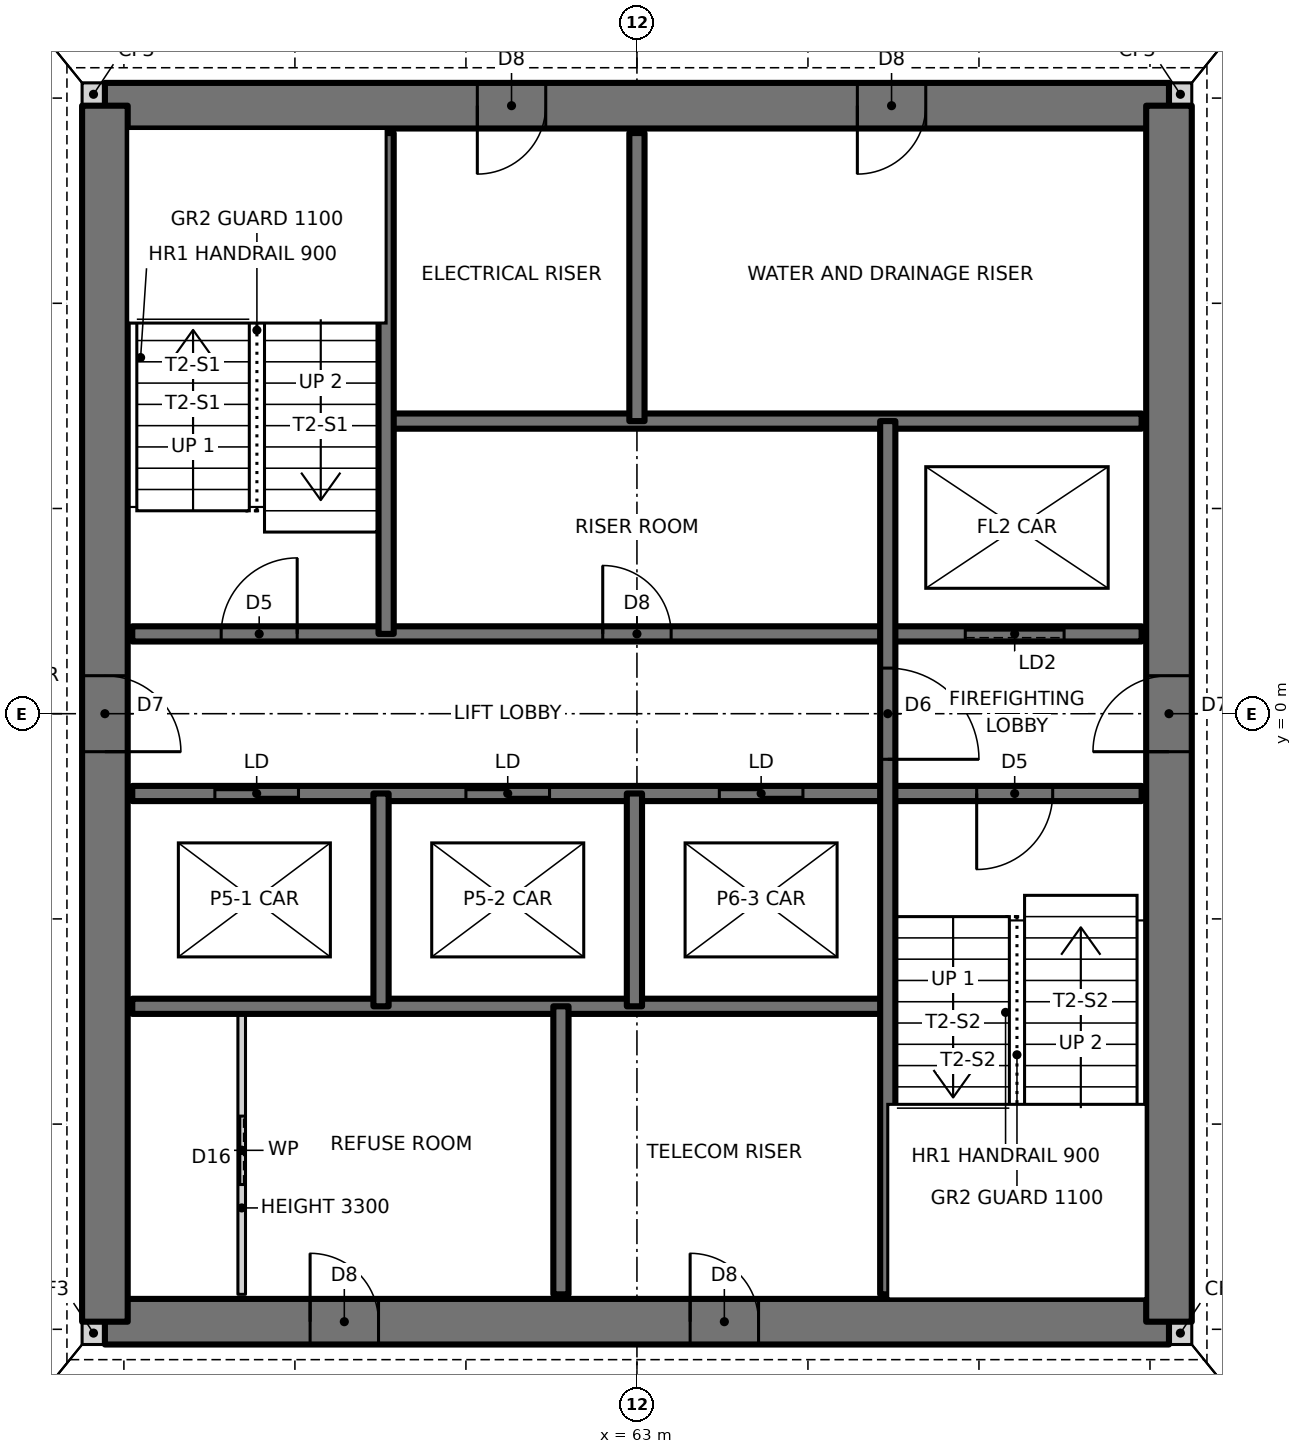
"""IFC4 building model, lengths in metres.
Left out: names, types, materials, properties, quantities, classifications, styles, units other than length and angle.
Written with IfcOpenShell. Run it as: python <this file> out.ifc"""

import sys

from ifc_helpers import new_model, si_unit, direction, frame, frame_2d, origin, place, context, subcontext, project, spatial, rectangle, extrude, element, fill, save


model = new_model("IFC4")
c1 = context("Model", 3, precision=1e-05, world=origin(), true_north=direction((0.0, 1.0)))
c2 = subcontext(c1, "Body", "Model", "MODEL_VIEW")
j1 = project(units=[si_unit("LENGTHUNIT", "METRE"), si_unit("PLANEANGLEUNIT", "RADIAN")], contexts=[c1])
p1 = place(None, origin())
s1 = spatial("IfcSite", under=j1, at=p1, CompositionType="ELEMENT")
p2 = place(p1, origin())
s2 = spatial("IfcBuilding", under=s1, at=p2, CompositionType="ELEMENT")
p3 = place(p2, frame((0.0, 0.0, 115.5)))
s3 = spatial("IfcBuildingStorey", under=s2, at=p3, CompositionType="ELEMENT", Elevation=115.5)
for number, where, z_axis, x_axis in (
    (1, (55.7, -8.15, 0.0), (0.0, 0.0, 1.0), (1.0, 0.0, 0.0)),
    (2, (70.0, -8.15, 0.0), (0.0, 0.0, 1.0), (1.0, 0.0, 0.0)),
    (3, (70.0, 8.15, 0.0), (0.0, 0.0, 1.0), (1.0, 0.0, 0.0)),
    (4, (55.7, 8.15, 0.0), (0.0, 0.0, 1.0), (1.0, 0.0, 0.0)),
):
    element("IfcWall", number, at=place(p3, frame(where, z_axis=z_axis, x_axis=x_axis)), inside=s3, PredefinedType="SOLIDWALL", context=c2, shape_type="SweptSolid", body=[
        extrude(rectangle(XDim=0.3, YDim=0.3, at=frame_2d((0.15, 0.0))), origin(), (0.0, 0.0, 1.0), 3.5),
    ])
p4 = place(p3, frame((56.0, -8.0, 0.0), z_axis=(0.0, 0.0, 1.0), x_axis=(1.0, 0.0, 0.0)))
e5 = element("IfcWall", 5, at=p4, inside=s3, PredefinedType="SHEAR", context=c2, shape_type="SweptSolid", body=[
    extrude(rectangle(XDim=14.0, YDim=0.6, at=frame_2d((7.0, 0.0))), origin(), (0.0, 0.0, 1.0), 3.5),
])
p5 = place(p4, frame((2.7, 0.0, 0.0)))
e6 = element("IfcOpeningElement", 6, at=p5, cuts=e5, PredefinedType="OPENING", context=c2, shape_type="SweptSolid", body=[
    extrude(rectangle(XDim=0.9, YDim=2.1, at=frame_2d((0.45, 1.05))), frame((0.0, 0.31, 0.0), z_axis=(0.0, -1.0, 0.0), x_axis=(1.0, 0.0, 0.0)), (0.0, 0.0, 1.0), 0.62),
])
p6 = place(p4, frame((7.7, 0.0, 0.0)))
e7 = element("IfcOpeningElement", 7, at=p6, cuts=e5, PredefinedType="OPENING", context=c2, shape_type="SweptSolid", body=[
    extrude(rectangle(XDim=0.9, YDim=2.1, at=frame_2d((0.45, 1.05))), frame((0.0, 0.31, 0.0), z_axis=(0.0, -1.0, 0.0), x_axis=(1.0, 0.0, 0.0)), (0.0, 0.0, 1.0), 0.62),
])
p7 = place(p3, frame((70.0, 8.0, 0.0), z_axis=(0.0, 0.0, 1.0), x_axis=(-1.0, 0.0, 0.0)))
e8 = element("IfcWall", 8, at=p7, inside=s3, PredefinedType="SHEAR", context=c2, shape_type="SweptSolid", body=[
    extrude(rectangle(XDim=14.0, YDim=0.6, at=frame_2d((7.0, 0.0))), origin(), (0.0, 0.0, 1.0), 3.5),
])
p8 = place(p7, frame((8.2, 0.0, 0.0)))
e9 = element("IfcOpeningElement", 9, at=p8, cuts=e8, PredefinedType="OPENING", context=c2, shape_type="SweptSolid", body=[
    extrude(rectangle(XDim=0.9, YDim=2.1, at=frame_2d((0.45, 1.05))), frame((0.0, 0.31, 0.0), z_axis=(0.0, -1.0, 0.0), x_axis=(1.0, 0.0, 0.0)), (0.0, 0.0, 1.0), 0.62),
])
p9 = place(p7, frame((3.2, 0.0, 0.0)))
e10 = element("IfcOpeningElement", 10, at=p9, cuts=e8, PredefinedType="OPENING", context=c2, shape_type="SweptSolid", body=[
    extrude(rectangle(XDim=0.9, YDim=2.1, at=frame_2d((0.45, 1.05))), frame((0.0, 0.31, 0.0), z_axis=(0.0, -1.0, 0.0), x_axis=(1.0, 0.0, 0.0)), (0.0, 0.0, 1.0), 0.62),
])
p10 = place(p3, frame((70.0, -8.0, 0.0), z_axis=(0.0, 0.0, 1.0), x_axis=(0.0, 1.0, 0.0)))
e11 = element("IfcWall", 11, at=p10, inside=s3, PredefinedType="SHEAR", context=c2, shape_type="SweptSolid", body=[
    extrude(rectangle(XDim=16.0, YDim=0.6, at=frame_2d((8.0, 0.0))), origin(), (0.0, 0.0, 1.0), 3.5),
])
p11 = place(p10, frame((7.5, 0.0, 0.0)))
e12 = element("IfcOpeningElement", 12, at=p11, cuts=e11, PredefinedType="OPENING", context=c2, shape_type="SweptSolid", body=[
    extrude(rectangle(XDim=1.0, YDim=2.1, at=frame_2d((0.5, 1.05))), frame((0.0, 0.31, 0.0), z_axis=(0.0, -1.0, 0.0), x_axis=(1.0, 0.0, 0.0)), (0.0, 0.0, 1.0), 0.62),
])
p12 = place(p3, frame((56.0, 8.0, 0.0), z_axis=(0.0, 0.0, 1.0), x_axis=(0.0, -1.0, 0.0)))
e13 = element("IfcWall", 13, at=p12, inside=s3, PredefinedType="SHEAR", context=c2, shape_type="SweptSolid", body=[
    extrude(rectangle(XDim=16.0, YDim=0.6, at=frame_2d((8.0, 0.0))), origin(), (0.0, 0.0, 1.0), 3.5),
])
p13 = place(p12, frame((7.5, 0.0, 0.0)))
e14 = element("IfcOpeningElement", 14, at=p13, cuts=e13, PredefinedType="OPENING", context=c2, shape_type="SweptSolid", body=[
    extrude(rectangle(XDim=1.0, YDim=2.1, at=frame_2d((0.5, 1.05))), frame((0.0, 0.31, 0.0), z_axis=(0.0, -1.0, 0.0), x_axis=(1.0, 0.0, 0.0)), (0.0, 0.0, 1.0), 0.62),
])
p14 = place(p3, frame((56.36, -3.85, 0.0), z_axis=(0.0, 0.0, 1.0), x_axis=(1.0, 0.0, 0.0)))
e15 = element("IfcWall", 15, at=p14, inside=s3, PredefinedType="SOLIDWALL", context=c2, shape_type="SweptSolid", body=[
    extrude(rectangle(XDim=9.94, YDim=0.2, at=frame_2d((4.97, 0.0))), origin(), (0.0, 0.0, 1.0), 3.5),
])
p15 = place(p3, frame((56.36, -1.05, 0.0), z_axis=(0.0, 0.0, 1.0), x_axis=(1.0, 0.0, 0.0)))
e16 = element("IfcWall", 16, at=p15, inside=s3, PredefinedType="SOLIDWALL", context=c2, shape_type="SweptSolid", body=[
    extrude(rectangle(XDim=13.28, YDim=0.2, at=frame_2d((6.64, 0.0))), origin(), (0.0, 0.0, 1.0), 3.5),
])
p16 = place(p15, frame((11.11, 0.0, 0.0)))
e17 = element("IfcOpeningElement", 17, at=p16, cuts=e16, PredefinedType="OPENING", context=c2, shape_type="SweptSolid", body=[
    extrude(rectangle(XDim=1.0, YDim=2.1, at=frame_2d((0.5, 1.05))), frame((0.0, 0.11, 0.0), z_axis=(0.0, -1.0, 0.0), x_axis=(1.0, 0.0, 0.0)), (0.0, 0.0, 1.0), 0.22),
])
p17 = place(p15, frame((1.087, 0.0, 0.0)))
e18 = element("IfcOpeningElement", 18, at=p17, cuts=e16, PredefinedType="OPENING", context=c2, shape_type="SweptSolid", body=[
    extrude(rectangle(XDim=1.1, YDim=2.1, at=frame_2d((0.55, 1.05))), frame((0.0, 0.11, 0.0), z_axis=(0.0, -1.0, 0.0), x_axis=(1.0, 0.0, 0.0)), (0.0, 0.0, 1.0), 0.22),
])
p18 = place(p15, frame((4.39, 0.0, 0.0)))
e19 = element("IfcOpeningElement", 19, at=p18, cuts=e16, PredefinedType="OPENING", context=c2, shape_type="SweptSolid", body=[
    extrude(rectangle(XDim=1.1, YDim=2.1, at=frame_2d((0.55, 1.05))), frame((0.0, 0.11, 0.0), z_axis=(0.0, -1.0, 0.0), x_axis=(1.0, 0.0, 0.0)), (0.0, 0.0, 1.0), 0.22),
])
p19 = place(p15, frame((7.724, 0.0, 0.0)))
e20 = element("IfcOpeningElement", 20, at=p19, cuts=e16, PredefinedType="OPENING", context=c2, shape_type="SweptSolid", body=[
    extrude(rectangle(XDim=1.1, YDim=2.1, at=frame_2d((0.55, 1.05))), frame((0.0, 0.11, 0.0), z_axis=(0.0, -1.0, 0.0), x_axis=(1.0, 0.0, 0.0)), (0.0, 0.0, 1.0), 0.22),
])
p20 = place(p3, frame((56.36, 1.05, 0.0), z_axis=(0.0, 0.0, 1.0), x_axis=(1.0, 0.0, 0.0)))
e21 = element("IfcWall", 21, at=p20, inside=s3, PredefinedType="SOLIDWALL", context=c2, shape_type="SweptSolid", body=[
    extrude(rectangle(XDim=13.28, YDim=0.2, at=frame_2d((6.64, 0.0))), origin(), (0.0, 0.0, 1.0), 3.5),
])
p21 = place(p20, frame((1.17, 0.0, 0.0)))
e22 = element("IfcOpeningElement", 22, at=p21, cuts=e21, PredefinedType="OPENING", context=c2, shape_type="SweptSolid", body=[
    extrude(rectangle(XDim=1.0, YDim=2.1, at=frame_2d((0.5, 1.05))), frame((0.0, 0.11, 0.0), z_axis=(0.0, -1.0, 0.0), x_axis=(1.0, 0.0, 0.0)), (0.0, 0.0, 1.0), 0.22),
])
p22 = place(p20, frame((6.19, 0.0, 0.0)))
e23 = element("IfcOpeningElement", 23, at=p22, cuts=e21, PredefinedType="OPENING", context=c2, shape_type="SweptSolid", body=[
    extrude(rectangle(XDim=0.9, YDim=2.1, at=frame_2d((0.45, 1.05))), frame((0.0, 0.11, 0.0), z_axis=(0.0, -1.0, 0.0), x_axis=(1.0, 0.0, 0.0)), (0.0, 0.0, 1.0), 0.22),
])
p23 = place(p20, frame((10.96, 0.0, 0.0)))
e24 = element("IfcOpeningElement", 24, at=p23, cuts=e21, PredefinedType="OPENING", context=c2, shape_type="SweptSolid", body=[
    extrude(rectangle(XDim=1.3, YDim=2.1, at=frame_2d((0.65, 1.05))), frame((0.0, 0.11, 0.0), z_axis=(0.0, -1.0, 0.0), x_axis=(1.0, 0.0, 0.0)), (0.0, 0.0, 1.0), 0.22),
])
p24 = place(p3, frame((59.7, 3.85, 0.0), z_axis=(0.0, 0.0, 1.0), x_axis=(1.0, 0.0, 0.0)))
e25 = element("IfcWall", 25, at=p24, inside=s3, PredefinedType="SOLIDWALL", context=c2, shape_type="SweptSolid", body=[
    extrude(rectangle(XDim=9.94, YDim=0.2, at=frame_2d((4.97, 0.0))), origin(), (0.0, 0.0, 1.0), 3.5),
])
p25 = place(p3, frame((66.3, -7.64, 0.0), z_axis=(0.0, 0.0, 1.0), x_axis=(0.0, 1.0, 0.0)))
e26 = element("IfcWall", 26, at=p25, inside=s3, PredefinedType="SOLIDWALL", context=c2, shape_type="SweptSolid", body=[
    extrude(rectangle(XDim=11.49, YDim=0.2, at=frame_2d((5.745, 0.0))), origin(), (0.0, 0.0, 1.0), 3.5),
])
p26 = place(p25, frame((7.04, 0.0, 0.0)))
e27 = element("IfcOpeningElement", 27, at=p26, cuts=e26, PredefinedType="OPENING", context=c2, shape_type="SweptSolid", body=[
    extrude(rectangle(XDim=1.2, YDim=2.1, at=frame_2d((0.6, 1.05))), frame((0.0, 0.11, 0.0), z_axis=(0.0, -1.0, 0.0), x_axis=(1.0, 0.0, 0.0)), (0.0, 0.0, 1.0), 0.22),
])
p27 = place(p3, frame((63.0, 3.85, 0.0), z_axis=(0.0, 0.0, 1.0), x_axis=(0.0, 1.0, 0.0)))
e28 = element("IfcWall", 28, at=p27, inside=s3, PredefinedType="SOLIDWALL", context=c2, shape_type="SweptSolid", body=[
    extrude(rectangle(XDim=3.79, YDim=0.2, at=frame_2d((1.895, 0.0))), origin(), (0.0, 0.0, 1.0), 3.5),
])
p28 = place(p3, frame((62.967, -3.85, 0.0), z_axis=(0.0, 0.0, 1.0), x_axis=(0.0, 1.0, 0.0)))
e29 = element("IfcWall", 29, at=p28, inside=s3, PredefinedType="SOLIDWALL", context=c2, shape_type="SweptSolid", body=[
    extrude(rectangle(XDim=2.8, YDim=0.2, at=frame_2d((1.4, 0.0))), origin(), (0.0, 0.0, 1.0), 3.5),
])
p29 = place(p3, frame((62.0, -7.64, 0.0), z_axis=(0.0, 0.0, 1.0), x_axis=(0.0, 1.0, 0.0)))
e30 = element("IfcWall", 30, at=p29, inside=s3, PredefinedType="SOLIDWALL", context=c2, shape_type="SweptSolid", body=[
    extrude(rectangle(XDim=3.79, YDim=0.2, at=frame_2d((1.895, 0.0))), origin(), (0.0, 0.0, 1.0), 3.5),
])
p30 = place(p3, frame((59.7, 1.05, 0.0), z_axis=(0.0, 0.0, 1.0), x_axis=(0.0, 1.0, 0.0)))
e31 = element("IfcWall", 31, at=p30, inside=s3, PredefinedType="SOLIDWALL", context=c2, shape_type="SweptSolid", body=[
    extrude(rectangle(XDim=6.59, YDim=0.2, at=frame_2d((3.295, 0.0))), origin(), (0.0, 0.0, 1.0), 3.5),
])
p31 = place(p3, frame((59.633, -3.85, 0.0), z_axis=(0.0, 0.0, 1.0), x_axis=(0.0, 1.0, 0.0)))
e32 = element("IfcWall", 32, at=p31, inside=s3, PredefinedType="SOLIDWALL", context=c2, shape_type="SweptSolid", body=[
    extrude(rectangle(XDim=2.8, YDim=0.2, at=frame_2d((1.4, 0.0))), origin(), (0.0, 0.0, 1.0), 3.5),
])
p32 = place(p3, frame((57.8, -7.64, 0.0), z_axis=(0.0, 0.0, 1.0), x_axis=(0.0, 1.0, 0.0)))
e33 = element("IfcWall", 33, at=p32, inside=s3, PredefinedType="PARTITIONING", context=c2, shape_type="SweptSolid", body=[
    extrude(rectangle(XDim=3.79, YDim=0.1, at=frame_2d((1.895, 0.0))), origin(), (0.0, 0.0, 1.0), 3.3),
])
p33 = place(p32, frame((1.445, 0.0, 0.0)))
e34 = element("IfcOpeningElement", 34, at=p33, cuts=e33, PredefinedType="OPENING", context=c2, shape_type="SweptSolid", body=[
    extrude(rectangle(XDim=0.9, YDim=2.1, at=frame_2d((0.45, 1.05))), frame((0.0, 0.06, 0.0), z_axis=(0.0, -1.0, 0.0), x_axis=(1.0, 0.0, 0.0)), (0.0, 0.0, 1.0), 0.12),
])
p34 = place(p21, origin())
e35 = element("IfcDoor", 35, at=p34, inside=s3, OperationType="SINGLE_SWING_RIGHT", PredefinedType="DOOR", context=c2, shape_type="SweptSolid", body=[
    extrude(rectangle(XDim=1.0, YDim=2.1, at=frame_2d((0.5, 1.05))), frame((0.0, 0.025, 0.0), z_axis=(0.0, -1.0, 0.0), x_axis=(1.0, 0.0, 0.0)), (0.0, 0.0, 1.0), 0.05),
])
fill(e22, e35)
p35 = place(p16, frame((1.0, 0.0, 0.0), z_axis=(0.0, 0.0, 1.0), x_axis=(-1.0, 0.0, 0.0)))
e36 = element("IfcDoor", 36, at=p35, inside=s3, OperationType="SINGLE_SWING_RIGHT", PredefinedType="DOOR", context=c2, shape_type="SweptSolid", body=[
    extrude(rectangle(XDim=1.0, YDim=2.1, at=frame_2d((0.5, 1.05))), frame((0.0, 0.025, 0.0), z_axis=(0.0, -1.0, 0.0), x_axis=(1.0, 0.0, 0.0)), (0.0, 0.0, 1.0), 0.05),
])
fill(e17, e36)
p36 = place(p26, frame((1.2, 0.0, 0.0), z_axis=(0.0, 0.0, 1.0), x_axis=(-1.0, 0.0, 0.0)))
e37 = element("IfcDoor", 37, at=p36, inside=s3, OperationType="SINGLE_SWING_RIGHT", PredefinedType="DOOR", context=c2, shape_type="SweptSolid", body=[
    extrude(rectangle(XDim=1.2, YDim=2.1, at=frame_2d((0.6, 1.05))), frame((0.0, 0.025, 0.0), z_axis=(0.0, -1.0, 0.0), x_axis=(1.0, 0.0, 0.0)), (0.0, 0.0, 1.0), 0.05),
])
fill(e27, e37)
p37 = place(p22, origin())
e38 = element("IfcDoor", 38, at=p37, inside=s3, OperationType="SINGLE_SWING_LEFT", PredefinedType="DOOR", context=c2, shape_type="SweptSolid", body=[
    extrude(rectangle(XDim=0.9, YDim=2.1, at=frame_2d((0.45, 1.05))), frame((0.0, 0.025, 0.0), z_axis=(0.0, -1.0, 0.0), x_axis=(1.0, 0.0, 0.0)), (0.0, 0.0, 1.0), 0.05),
])
fill(e23, e38)
p38 = place(p33, origin())
e39 = element("IfcDoor", 39, at=p38, inside=s3, OperationType="SLIDING_TO_LEFT", PredefinedType="DOOR", context=c2, shape_type="SweptSolid", body=[
    extrude(rectangle(XDim=0.9, YDim=2.1, at=frame_2d((0.45, 1.05))), frame((0.0, 0.025, 0.0), z_axis=(0.0, -1.0, 0.0), x_axis=(1.0, 0.0, 0.0)), (0.0, 0.0, 1.0), 0.05),
])
fill(e34, e39)
p39 = place(p13, origin())
e40 = element("IfcDoor", 40, at=p39, inside=s3, OperationType="SINGLE_SWING_RIGHT", PredefinedType="DOOR", context=c2, shape_type="SweptSolid", body=[
    extrude(rectangle(XDim=1.0, YDim=2.1, at=frame_2d((0.5, 1.05))), frame((0.0, 0.025, 0.0), z_axis=(0.0, -1.0, 0.0), x_axis=(1.0, 0.0, 0.0)), (0.0, 0.0, 1.0), 0.05),
])
fill(e14, e40)
p40 = place(p11, origin())
e41 = element("IfcDoor", 41, at=p40, inside=s3, OperationType="SINGLE_SWING_LEFT", PredefinedType="DOOR", context=c2, shape_type="SweptSolid", body=[
    extrude(rectangle(XDim=1.0, YDim=2.1, at=frame_2d((0.5, 1.05))), frame((0.0, 0.025, 0.0), z_axis=(0.0, -1.0, 0.0), x_axis=(1.0, 0.0, 0.0)), (0.0, 0.0, 1.0), 0.05),
])
fill(e12, e41)
p41 = place(p8, origin())
e42 = element("IfcDoor", 42, at=p41, inside=s3, OperationType="SINGLE_SWING_RIGHT", PredefinedType="DOOR", context=c2, shape_type="SweptSolid", body=[
    extrude(rectangle(XDim=0.9, YDim=2.1, at=frame_2d((0.45, 1.05))), frame((0.0, 0.025, 0.0), z_axis=(0.0, -1.0, 0.0), x_axis=(1.0, 0.0, 0.0)), (0.0, 0.0, 1.0), 0.05),
])
fill(e9, e42)
p42 = place(p9, origin())
e43 = element("IfcDoor", 43, at=p42, inside=s3, OperationType="SINGLE_SWING_RIGHT", PredefinedType="DOOR", context=c2, shape_type="SweptSolid", body=[
    extrude(rectangle(XDim=0.9, YDim=2.1, at=frame_2d((0.45, 1.05))), frame((0.0, 0.025, 0.0), z_axis=(0.0, -1.0, 0.0), x_axis=(1.0, 0.0, 0.0)), (0.0, 0.0, 1.0), 0.05),
])
fill(e10, e43)
p43 = place(p5, origin())
e44 = element("IfcDoor", 44, at=p43, inside=s3, OperationType="SINGLE_SWING_LEFT", PredefinedType="DOOR", context=c2, shape_type="SweptSolid", body=[
    extrude(rectangle(XDim=0.9, YDim=2.1, at=frame_2d((0.45, 1.05))), frame((0.0, 0.025, 0.0), z_axis=(0.0, -1.0, 0.0), x_axis=(1.0, 0.0, 0.0)), (0.0, 0.0, 1.0), 0.05),
])
fill(e6, e44)
p44 = place(p6, origin())
e45 = element("IfcDoor", 45, at=p44, inside=s3, OperationType="SINGLE_SWING_LEFT", PredefinedType="DOOR", context=c2, shape_type="SweptSolid", body=[
    extrude(rectangle(XDim=0.9, YDim=2.1, at=frame_2d((0.45, 1.05))), frame((0.0, 0.025, 0.0), z_axis=(0.0, -1.0, 0.0), x_axis=(1.0, 0.0, 0.0)), (0.0, 0.0, 1.0), 0.05),
])
fill(e7, e45)
p45 = place(p17, origin())
e46 = element("IfcDoor", 46, at=p45, inside=s3, OperationType="DOUBLE_DOOR_SLIDING", PredefinedType="DOOR", context=c2, shape_type="SweptSolid", body=[
    extrude(rectangle(XDim=1.1, YDim=2.1, at=frame_2d((0.55, 1.05))), frame((0.0, 0.025, 0.0), z_axis=(0.0, -1.0, 0.0), x_axis=(1.0, 0.0, 0.0)), (0.0, 0.0, 1.0), 0.05),
])
fill(e18, e46)
p46 = place(p18, origin())
e47 = element("IfcDoor", 47, at=p46, inside=s3, OperationType="DOUBLE_DOOR_SLIDING", PredefinedType="DOOR", context=c2, shape_type="SweptSolid", body=[
    extrude(rectangle(XDim=1.1, YDim=2.1, at=frame_2d((0.55, 1.05))), frame((0.0, 0.025, 0.0), z_axis=(0.0, -1.0, 0.0), x_axis=(1.0, 0.0, 0.0)), (0.0, 0.0, 1.0), 0.05),
])
fill(e19, e47)
p47 = place(p19, origin())
e48 = element("IfcDoor", 48, at=p47, inside=s3, OperationType="DOUBLE_DOOR_SLIDING", PredefinedType="DOOR", context=c2, shape_type="SweptSolid", body=[
    extrude(rectangle(XDim=1.1, YDim=2.1, at=frame_2d((0.55, 1.05))), frame((0.0, 0.025, 0.0), z_axis=(0.0, -1.0, 0.0), x_axis=(1.0, 0.0, 0.0)), (0.0, 0.0, 1.0), 0.05),
])
fill(e20, e48)
p48 = place(p23, origin())
e49 = element("IfcDoor", 49, at=p48, inside=s3, OperationType="SLIDING_TO_LEFT", PredefinedType="DOOR", context=c2, shape_type="SweptSolid", body=[
    extrude(rectangle(XDim=1.3, YDim=2.1, at=frame_2d((0.65, 1.05))), frame((0.0, 0.025, 0.0), z_axis=(0.0, -1.0, 0.0), x_axis=(1.0, 0.0, 0.0)), (0.0, 0.0, 1.0), 0.05),
])
fill(e24, e49)
save(model, sys.argv[1])
